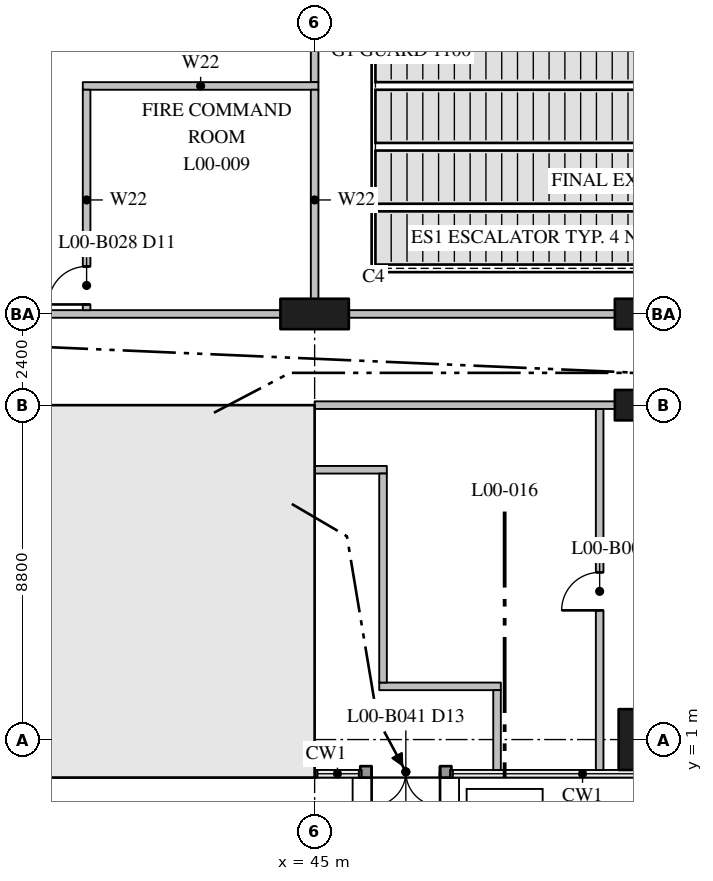
"""IFC4 building model, lengths in metres.
Left out: names, types, materials, properties, quantities, classifications, styles, units other than length and angle.
Written with IfcOpenShell. Run it as: python <this file> out.ifc"""

import sys

from ifc_helpers import new_model, si_unit, direction, frame, frame_2d, origin, origin_2d, place, context, subcontext, project, spatial, rectangle, extrude, element, fill, save


model = new_model("IFC4")
c1 = context("Model", 3, precision=1e-05, world=origin(), true_north=direction((0.0, 1.0)))
c2 = subcontext(c1, "Body", "Model", "MODEL_VIEW")
j1 = project(units=[si_unit("LENGTHUNIT", "METRE"), si_unit("PLANEANGLEUNIT", "RADIAN")], contexts=[c1])
p1 = place(None, origin())
s1 = spatial("IfcSite", under=j1, at=p1, CompositionType="ELEMENT")
p2 = place(p1, origin())
s2 = spatial("IfcBuilding", under=s1, at=p2, CompositionType="ELEMENT")
p3 = place(p2, origin())
s3 = spatial("IfcBuildingStorey", under=s2, at=p3, CompositionType="ELEMENT", Elevation=0.0)
p4 = place(p3, frame((45.0, 12.2, 0.0), z_axis=(0.0, 0.0, 1.0), x_axis=(1.0, 0.0, 0.0)))
e1 = element("IfcColumn", 1, at=p4, inside=s3, PredefinedType="COLUMN", context=c2, shape_type="SweptSolid", body=[
    extrude(rectangle(XDim=1.8, YDim=0.8, at=origin_2d()), origin(), (0.0, 0.0, 1.0), 7.5),
])
p5 = place(p3, frame((53.8, 1.0, 0.0), z_axis=(0.0, 0.0, 1.0), x_axis=(1.0, 0.0, 0.0)))
e2 = element("IfcColumn", 2, at=p5, inside=s3, PredefinedType="COLUMN", context=c2, shape_type="SweptSolid", body=[
    extrude(rectangle(XDim=1.6, YDim=1.6, at=origin_2d()), origin(), (0.0, 0.0, 1.0), 7.5),
])
for number, where, z_axis, x_axis in (
    (3, (53.8, 9.8, 0.0), (0.0, 0.0, 1.0), (1.0, 0.0, 0.0)),
    (4, (53.8, 12.2, 0.0), (0.0, 0.0, 1.0), (1.0, 0.0, 0.0)),
):
    element("IfcColumn", number, at=place(p3, frame(where, z_axis=z_axis, x_axis=x_axis)), inside=s3, PredefinedType="COLUMN", context=c2, shape_type="SweptSolid", body=[
        extrude(rectangle(XDim=1.8, YDim=0.8, at=origin_2d()), origin(), (0.0, 0.0, 1.0), 7.5),
    ])
p6 = place(p3, frame((9.8, 0.6, 0.0), z_axis=(0.0, 0.0, 1.0), x_axis=(1.0, 0.0, 0.0)))
e5 = element("IfcWall", 5, at=p6, inside=s3, PredefinedType="SHEAR", context=c2, shape_type="SweptSolid", body=[
    extrude(rectangle(XDim=35.2, YDim=1.2, at=frame_2d((17.6, 0.0))), origin(), (0.0, 0.0, 1.0), 7.5),
])
p7 = place(p3, frame((44.4, 1.2, 0.0), z_axis=(0.0, 0.0, 1.0), x_axis=(0.0, 1.0, 0.0)))
e6 = element("IfcWall", 6, at=p7, inside=s3, PredefinedType="SHEAR", context=c2, shape_type="SweptSolid", body=[
    extrude(rectangle(XDim=8.6, YDim=1.2, at=frame_2d((4.3, 0.0))), origin(), (0.0, 0.0, 1.0), 7.5),
])
p8 = place(p7, frame((5.4, 0.0, 0.0)))
e7 = element("IfcOpeningElement", 7, at=p8, cuts=e6, PredefinedType="OPENING", context=c2, shape_type="SweptSolid", body=[
    extrude(rectangle(XDim=1.2, YDim=2.1, at=frame_2d((0.6, 1.05))), frame((0.0, 0.61, 0.0), z_axis=(0.0, -1.0, 0.0), x_axis=(1.0, 0.0, 0.0)), (0.0, 0.0, 1.0), 1.22),
])
p9 = place(p3, frame((40.7, 9.6, 0.0), z_axis=(0.0, 0.0, 1.0), x_axis=(1.0, 0.0, 0.0)))
e8 = element("IfcWall", 8, at=p9, inside=s3, PredefinedType="SHEAR", context=c2, shape_type="SweptSolid", body=[
    extrude(rectangle(XDim=4.3, YDim=0.4, at=frame_2d((2.15, 0.0))), origin(), (0.0, 0.0, 1.0), 7.5),
])
p10 = place(p9, frame((1.05, 0.0, 0.0)))
e9 = element("IfcOpeningElement", 9, at=p10, cuts=e8, PredefinedType="OPENING", context=c2, shape_type="SweptSolid", body=[
    extrude(rectangle(XDim=1.2, YDim=2.1, at=frame_2d((0.6, 1.05))), frame((0.0, 0.21, 0.0), z_axis=(0.0, -1.0, 0.0), x_axis=(1.0, 0.0, 0.0)), (0.0, 0.0, 1.0), 0.42),
])
p11 = place(p3, frame((27.1, 9.6, 0.0), z_axis=(0.0, 0.0, 1.0), x_axis=(1.0, 0.0, 0.0)))
e10 = element("IfcWall", 10, at=p11, inside=s3, PredefinedType="SHEAR", context=c2, shape_type="SweptSolid", body=[
    extrude(rectangle(XDim=13.6, YDim=0.4, at=frame_2d((6.8, 0.0))), origin(), (0.0, 0.0, 1.0), 7.5),
])
p12 = place(p11, frame((0.85, 0.0, 0.0)))
e11 = element("IfcOpeningElement", 11, at=p12, cuts=e10, PredefinedType="OPENING", context=c2, shape_type="SweptSolid", body=[
    extrude(rectangle(XDim=0.9, YDim=2.1, at=frame_2d((0.45, 1.05))), frame((0.0, 0.21, 0.0), z_axis=(0.0, -1.0, 0.0), x_axis=(1.0, 0.0, 0.0)), (0.0, 0.0, 1.0), 0.42),
])
p13 = place(p11, frame((3.4, 0.0, 0.0)))
e12 = element("IfcOpeningElement", 12, at=p13, cuts=e10, PredefinedType="OPENING", context=c2, shape_type="SweptSolid", body=[
    extrude(rectangle(XDim=1.0, YDim=2.1, at=frame_2d((0.5, 1.05))), frame((0.0, 0.21, 0.0), z_axis=(0.0, -1.0, 0.0), x_axis=(1.0, 0.0, 0.0)), (0.0, 0.0, 1.0), 0.42),
])
p14 = place(p3, frame((14.1, 3.8, 0.0), z_axis=(0.0, 0.0, 1.0), x_axis=(1.0, 0.0, 0.0)))
e13 = element("IfcWall", 13, at=p14, inside=s3, PredefinedType="SHEAR", context=c2, shape_type="SweptSolid", body=[
    extrude(rectangle(XDim=26.6, YDim=0.4, at=frame_2d((13.3, 0.0))), origin(), (0.0, 0.0, 1.0), 7.5),
])
p15 = place(p14, frame((0.95, 0.0, 0.0)))
e14 = element("IfcOpeningElement", 14, at=p15, cuts=e13, PredefinedType="OPENING", context=c2, shape_type="SweptSolid", body=[
    extrude(rectangle(XDim=1.3, YDim=2.1, at=frame_2d((0.65, 1.05))), frame((0.0, 0.21, 0.0), z_axis=(0.0, -1.0, 0.0), x_axis=(1.0, 0.0, 0.0)), (0.0, 0.0, 1.0), 0.42),
])
p16 = place(p14, frame((3.95, 0.0, 0.0)))
e15 = element("IfcOpeningElement", 15, at=p16, cuts=e13, PredefinedType="OPENING", context=c2, shape_type="SweptSolid", body=[
    extrude(rectangle(XDim=1.1, YDim=2.1, at=frame_2d((0.55, 1.05))), frame((0.0, 0.21, 0.0), z_axis=(0.0, -1.0, 0.0), x_axis=(1.0, 0.0, 0.0)), (0.0, 0.0, 1.0), 0.42),
])
p17 = place(p14, frame((6.55, 0.0, 0.0)))
e16 = element("IfcOpeningElement", 16, at=p17, cuts=e13, PredefinedType="OPENING", context=c2, shape_type="SweptSolid", body=[
    extrude(rectangle(XDim=1.1, YDim=2.1, at=frame_2d((0.55, 1.05))), frame((0.0, 0.21, 0.0), z_axis=(0.0, -1.0, 0.0), x_axis=(1.0, 0.0, 0.0)), (0.0, 0.0, 1.0), 0.42),
])
p18 = place(p14, frame((9.15, 0.0, 0.0)))
e17 = element("IfcOpeningElement", 17, at=p18, cuts=e13, PredefinedType="OPENING", context=c2, shape_type="SweptSolid", body=[
    extrude(rectangle(XDim=1.1, YDim=2.1, at=frame_2d((0.55, 1.05))), frame((0.0, 0.21, 0.0), z_axis=(0.0, -1.0, 0.0), x_axis=(1.0, 0.0, 0.0)), (0.0, 0.0, 1.0), 0.42),
])
p19 = place(p14, frame((11.75, 0.0, 0.0)))
e18 = element("IfcOpeningElement", 18, at=p19, cuts=e13, PredefinedType="OPENING", context=c2, shape_type="SweptSolid", body=[
    extrude(rectangle(XDim=1.1, YDim=2.1, at=frame_2d((0.55, 1.05))), frame((0.0, 0.21, 0.0), z_axis=(0.0, -1.0, 0.0), x_axis=(1.0, 0.0, 0.0)), (0.0, 0.0, 1.0), 0.42),
])
p20 = place(p14, frame((14.35, 0.0, 0.0)))
e19 = element("IfcOpeningElement", 19, at=p20, cuts=e13, PredefinedType="OPENING", context=c2, shape_type="SweptSolid", body=[
    extrude(rectangle(XDim=1.1, YDim=2.1, at=frame_2d((0.55, 1.05))), frame((0.0, 0.21, 0.0), z_axis=(0.0, -1.0, 0.0), x_axis=(1.0, 0.0, 0.0)), (0.0, 0.0, 1.0), 0.42),
])
p21 = place(p14, frame((16.95, 0.0, 0.0)))
e20 = element("IfcOpeningElement", 20, at=p21, cuts=e13, PredefinedType="OPENING", context=c2, shape_type="SweptSolid", body=[
    extrude(rectangle(XDim=1.1, YDim=2.1, at=frame_2d((0.55, 1.05))), frame((0.0, 0.21, 0.0), z_axis=(0.0, -1.0, 0.0), x_axis=(1.0, 0.0, 0.0)), (0.0, 0.0, 1.0), 0.42),
])
p22 = place(p14, frame((19.55, 0.0, 0.0)))
e21 = element("IfcOpeningElement", 21, at=p22, cuts=e13, PredefinedType="OPENING", context=c2, shape_type="SweptSolid", body=[
    extrude(rectangle(XDim=1.1, YDim=2.1, at=frame_2d((0.55, 1.05))), frame((0.0, 0.21, 0.0), z_axis=(0.0, -1.0, 0.0), x_axis=(1.0, 0.0, 0.0)), (0.0, 0.0, 1.0), 0.42),
])
p23 = place(p14, frame((22.15, 0.0, 0.0)))
e22 = element("IfcOpeningElement", 22, at=p23, cuts=e13, PredefinedType="OPENING", context=c2, shape_type="SweptSolid", body=[
    extrude(rectangle(XDim=1.1, YDim=2.1, at=frame_2d((0.55, 1.05))), frame((0.0, 0.21, 0.0), z_axis=(0.0, -1.0, 0.0), x_axis=(1.0, 0.0, 0.0)), (0.0, 0.0, 1.0), 0.42),
])
p24 = place(p14, frame((24.75, 0.0, 0.0)))
e23 = element("IfcOpeningElement", 23, at=p24, cuts=e13, PredefinedType="OPENING", context=c2, shape_type="SweptSolid", body=[
    extrude(rectangle(XDim=1.1, YDim=2.1, at=frame_2d((0.55, 1.05))), frame((0.0, 0.21, 0.0), z_axis=(0.0, -1.0, 0.0), x_axis=(1.0, 0.0, 0.0)), (0.0, 0.0, 1.0), 0.42),
])
p25 = place(p3, frame((14.1, 6.8, 0.0), z_axis=(0.0, 0.0, 1.0), x_axis=(1.0, 0.0, 0.0)))
e24 = element("IfcWall", 24, at=p25, inside=s3, PredefinedType="SHEAR", context=c2, shape_type="SweptSolid", body=[
    extrude(rectangle(XDim=26.6, YDim=0.4, at=frame_2d((13.3, 0.0))), origin(), (0.0, 0.0, 1.0), 7.5),
])
p26 = place(p25, frame((10.8, 0.0, 0.0)))
e25 = element("IfcOpeningElement", 25, at=p26, cuts=e24, PredefinedType="OPENING", context=c2, shape_type="SweptSolid", body=[
    extrude(rectangle(XDim=1.8, YDim=2.1, at=frame_2d((0.9, 1.05))), frame((0.0, 0.21, 0.0), z_axis=(0.0, -1.0, 0.0), x_axis=(1.0, 0.0, 0.0)), (0.0, 0.0, 1.0), 0.42),
])
p27 = place(p25, frame((24.35, 0.0, 0.0)))
e26 = element("IfcOpeningElement", 26, at=p27, cuts=e24, PredefinedType="OPENING", context=c2, shape_type="SweptSolid", body=[
    extrude(rectangle(XDim=1.3, YDim=2.1, at=frame_2d((0.65, 1.05))), frame((0.0, 0.21, 0.0), z_axis=(0.0, -1.0, 0.0), x_axis=(1.0, 0.0, 0.0)), (0.0, 0.0, 1.0), 0.42),
])
p28 = place(p3, frame((40.7, 1.2, 0.0), z_axis=(0.0, 0.0, 1.0), x_axis=(0.0, 1.0, 0.0)))
e27 = element("IfcWall", 27, at=p28, inside=s3, PredefinedType="SHEAR", context=c2, shape_type="SweptSolid", body=[
    extrude(rectangle(XDim=8.4, YDim=0.4, at=frame_2d((4.2, 0.0))), origin(), (0.0, 0.0, 1.0), 7.5),
])
p29 = place(p28, frame((4.45, 0.0, 0.0)))
e28 = element("IfcOpeningElement", 28, at=p29, cuts=e27, PredefinedType="OPENING", context=c2, shape_type="SweptSolid", body=[
    extrude(rectangle(XDim=0.9, YDim=2.1, at=frame_2d((0.45, 1.05))), frame((0.0, 0.21, 0.0), z_axis=(0.0, -1.0, 0.0), x_axis=(1.0, 0.0, 0.0)), (0.0, 0.0, 1.0), 0.42),
])
p30 = place(p3, frame((38.1, 1.2, 0.0), z_axis=(0.0, 0.0, 1.0), x_axis=(0.0, 1.0, 0.0)))
e29 = element("IfcWall", 29, at=p30, inside=s3, PredefinedType="SHEAR", context=c2, shape_type="SweptSolid", body=[
    extrude(rectangle(XDim=2.4, YDim=0.25, at=frame_2d((1.2, 0.0))), origin(), (0.0, 0.0, 1.0), 7.5),
])
p31 = place(p3, frame((46.7, 2.4, 0.0), z_axis=(0.0, 0.0, 1.0), x_axis=(1.0, 0.0, 0.0)))
e30 = element("IfcWall", 30, at=p31, inside=s3, PredefinedType="PARTITIONING", context=c2, shape_type="SweptSolid", body=[
    extrude(rectangle(XDim=3.2, YDim=0.2, at=frame_2d((1.6, 0.0))), origin(), (0.0, 0.0, 1.0), 7.1),
])
p32 = place(p3, frame((45.0, 8.1, 0.0), z_axis=(0.0, 0.0, 1.0), x_axis=(1.0, 0.0, 0.0)))
e31 = element("IfcWall", 31, at=p32, inside=s3, PredefinedType="PARTITIONING", context=c2, shape_type="SweptSolid", body=[
    extrude(rectangle(XDim=1.9, YDim=0.2, at=frame_2d((0.95, 0.0))), origin(), (0.0, 0.0, 1.0), 7.1),
])
p33 = place(p3, frame((45.0, 9.8, 0.0), z_axis=(0.0, 0.0, 1.0), x_axis=(1.0, 0.0, 0.0)))
e32 = element("IfcWall", 32, at=p33, inside=s3, PredefinedType="PARTITIONING", context=c2, shape_type="SweptSolid", body=[
    extrude(rectangle(XDim=19.4, YDim=0.2, at=frame_2d((9.7, 0.0))), origin(), (0.0, 0.0, 1.0), 7.1),
])
p34 = place(p33, frame((10.6, 0.0, 0.0)))
e33 = element("IfcOpeningElement", 33, at=p34, cuts=e32, PredefinedType="OPENING", context=c2, shape_type="SweptSolid", body=[
    extrude(rectangle(XDim=1.8, YDim=2.1, at=frame_2d((0.9, 1.05))), frame((0.0, 0.11, 0.0), z_axis=(0.0, -1.0, 0.0), x_axis=(1.0, 0.0, 0.0)), (0.0, 0.0, 1.0), 0.22),
])
p35 = place(p33, frame((14.0, 0.0, 0.0)))
e34 = element("IfcOpeningElement", 34, at=p35, cuts=e32, PredefinedType="OPENING", context=c2, shape_type="SweptSolid", body=[
    extrude(rectangle(XDim=1.8, YDim=2.1, at=frame_2d((0.9, 1.05))), frame((0.0, 0.11, 0.0), z_axis=(0.0, -1.0, 0.0), x_axis=(1.0, 0.0, 0.0)), (0.0, 0.0, 1.0), 0.22),
])
p36 = place(p3, frame((35.4, 12.2, 0.0), z_axis=(0.0, 0.0, 1.0), x_axis=(1.0, 0.0, 0.0)))
e35 = element("IfcWall", 35, at=p36, inside=s3, PredefinedType="PARTITIONING", context=c2, shape_type="SweptSolid", body=[
    extrude(rectangle(XDim=22.4, YDim=0.2, at=frame_2d((11.2, 0.0))), origin(), (0.0, 0.0, 1.0), 7.1),
])
p37 = place(p3, frame((38.9, 18.2, 0.0), z_axis=(0.0, 0.0, 1.0), x_axis=(1.0, 0.0, 0.0)))
e36 = element("IfcWall", 36, at=p37, inside=s3, PredefinedType="PARTITIONING", context=c2, shape_type="SweptSolid", body=[
    extrude(rectangle(XDim=6.2, YDim=0.2, at=frame_2d((3.1, 0.0))), origin(), (0.0, 0.0, 1.0), 7.1),
])
p38 = place(p3, frame((46.8, 2.5, 0.0), z_axis=(0.0, 0.0, 1.0), x_axis=(0.0, 1.0, 0.0)))
e37 = element("IfcWall", 37, at=p38, inside=s3, PredefinedType="PARTITIONING", context=c2, shape_type="SweptSolid", body=[
    extrude(rectangle(XDim=5.5, YDim=0.2, at=frame_2d((2.75, 0.0))), origin(), (0.0, 0.0, 1.0), 7.1),
])
p39 = place(p3, frame((49.8, 0.2, 0.0), z_axis=(0.0, 0.0, 1.0), x_axis=(0.0, 1.0, 0.0)))
e38 = element("IfcWall", 38, at=p39, inside=s3, PredefinedType="PARTITIONING", context=c2, shape_type="SweptSolid", body=[
    extrude(rectangle(XDim=2.1, YDim=0.2, at=frame_2d((1.05, 0.0))), origin(), (0.0, 0.0, 1.0), 7.1),
])
p40 = place(p3, frame((39.0, 12.3, 0.0), z_axis=(0.0, 0.0, 1.0), x_axis=(0.0, 1.0, 0.0)))
e39 = element("IfcWall", 39, at=p40, inside=s3, PredefinedType="PARTITIONING", context=c2, shape_type="SweptSolid", body=[
    extrude(rectangle(XDim=5.8, YDim=0.2, at=frame_2d((2.9, 0.0))), origin(), (0.0, 0.0, 1.0), 7.1),
])
p41 = place(p40, frame((0.15, 0.0, 0.0)))
e40 = element("IfcOpeningElement", 40, at=p41, cuts=e39, PredefinedType="OPENING", context=c2, shape_type="SweptSolid", body=[
    extrude(rectangle(XDim=1.0, YDim=2.1, at=frame_2d((0.5, 1.05))), frame((0.0, 0.11, 0.0), z_axis=(0.0, -1.0, 0.0), x_axis=(1.0, 0.0, 0.0)), (0.0, 0.0, 1.0), 0.22),
])
p42 = place(p3, frame((45.0, 12.3, 0.0), z_axis=(0.0, 0.0, 1.0), x_axis=(0.0, 1.0, 0.0)))
e41 = element("IfcWall", 41, at=p42, inside=s3, PredefinedType="PARTITIONING", context=c2, shape_type="SweptSolid", body=[
    extrude(rectangle(XDim=5.8, YDim=0.2, at=frame_2d((2.9, 0.0))), origin(), (0.0, 0.0, 1.0), 7.1),
])
p43 = place(p3, frame((45.0, 18.3, 0.0), z_axis=(0.0, 0.0, 1.0), x_axis=(0.0, 1.0, 0.0)))
e42 = element("IfcWall", 42, at=p43, inside=s3, PredefinedType="PARTITIONING", context=c2, shape_type="SweptSolid", body=[
    extrude(rectangle(XDim=8.4, YDim=0.2, at=frame_2d((4.2, 0.0))), origin(), (0.0, 0.0, 1.0), 7.1),
])
p44 = place(p43, frame((4.4, 0.0, 0.0)))
e43 = element("IfcOpeningElement", 43, at=p44, cuts=e42, PredefinedType="OPENING", context=c2, shape_type="SweptSolid", body=[
    extrude(rectangle(XDim=2.4, YDim=2.4, at=frame_2d((1.2, 1.2))), frame((0.0, 0.11, 0.0), z_axis=(0.0, -1.0, 0.0), x_axis=(1.0, 0.0, 0.0)), (0.0, 0.0, 1.0), 0.22),
])
p45 = place(p3, frame((52.5, 0.2, 0.0), z_axis=(0.0, 0.0, 1.0), x_axis=(0.0, 1.0, 0.0)))
e44 = element("IfcWall", 44, at=p45, inside=s3, PredefinedType="PARTITIONING", context=c2, shape_type="SweptSolid", body=[
    extrude(rectangle(XDim=9.5, YDim=0.2, at=frame_2d((4.75, 0.0))), origin(), (0.0, 0.0, 1.0), 7.1),
])
p46 = place(p45, frame((4.2, 0.0, 0.0)))
e45 = element("IfcOpeningElement", 45, at=p46, cuts=e44, PredefinedType="OPENING", context=c2, shape_type="SweptSolid", body=[
    extrude(rectangle(XDim=1.0, YDim=2.1, at=frame_2d((0.5, 1.05))), frame((0.0, 0.11, 0.0), z_axis=(0.0, -1.0, 0.0), x_axis=(1.0, 0.0, 0.0)), (0.0, 0.0, 1.0), 0.22),
])
p47 = place(p3, frame((48.6, 0.15, 0.0), z_axis=(0.0, 0.0, 1.0), x_axis=(-1.0, 0.0, 0.0)))
e46 = element("IfcWall", 46, at=p47, inside=s3, PredefinedType="STANDARD", context=c2, shape_type="SweptSolid", body=[
    extrude(rectangle(XDim=2.4, YDim=0.3, at=frame_2d((1.2, 0.0))), origin(), (0.0, 0.0, 1.0), 7.1),
])
p48 = place(p47, frame((0.3, 0.0, 0.0)))
e47 = element("IfcOpeningElement", 47, at=p48, cuts=e46, PredefinedType="OPENING", context=c2, shape_type="SweptSolid", body=[
    extrude(rectangle(XDim=1.8, YDim=2.1, at=frame_2d((0.9, 1.05))), frame((0.0, 0.16, 0.0), z_axis=(0.0, -1.0, 0.0), x_axis=(1.0, 0.0, 0.0)), (0.0, 0.0, 1.0), 0.32),
])
p49 = place(p24, origin())
e48 = element("IfcDoor", 48, at=p49, inside=s3, OperationType="DOUBLE_DOOR_SLIDING", PredefinedType="DOOR", context=c2, shape_type="SweptSolid", body=[
    extrude(rectangle(XDim=1.1, YDim=2.1, at=frame_2d((0.55, 1.05))), frame((0.0, 0.025, 0.0), z_axis=(0.0, -1.0, 0.0), x_axis=(1.0, 0.0, 0.0)), (0.0, 0.0, 1.0), 0.05),
])
fill(e23, e48)
p50 = place(p27, origin())
e49 = element("IfcDoor", 49, at=p50, inside=s3, OperationType="DOUBLE_DOOR_SLIDING", PredefinedType="DOOR", context=c2, shape_type="SweptSolid", body=[
    extrude(rectangle(XDim=1.3, YDim=2.1, at=frame_2d((0.65, 1.05))), frame((0.0, 0.025, 0.0), z_axis=(0.0, -1.0, 0.0), x_axis=(1.0, 0.0, 0.0)), (0.0, 0.0, 1.0), 0.05),
])
fill(e26, e49)
p51 = place(p10, origin())
e50 = element("IfcDoor", 50, at=p51, inside=s3, OperationType="SINGLE_SWING_LEFT", PredefinedType="DOOR", context=c2, shape_type="SweptSolid", body=[
    extrude(rectangle(XDim=1.2, YDim=2.1, at=frame_2d((0.6, 1.05))), frame((0.0, 0.025, 0.0), z_axis=(0.0, -1.0, 0.0), x_axis=(1.0, 0.0, 0.0)), (0.0, 0.0, 1.0), 0.05),
])
fill(e9, e50)
p52 = place(p8, frame((1.2, 0.0, 0.0), z_axis=(0.0, 0.0, 1.0), x_axis=(-1.0, 0.0, 0.0)))
e51 = element("IfcDoor", 51, at=p52, inside=s3, OperationType="SINGLE_SWING_LEFT", PredefinedType="DOOR", context=c2, shape_type="SweptSolid", body=[
    extrude(rectangle(XDim=1.2, YDim=2.1, at=frame_2d((0.6, 1.05))), frame((0.0, 0.025, 0.0), z_axis=(0.0, -1.0, 0.0), x_axis=(1.0, 0.0, 0.0)), (0.0, 0.0, 1.0), 0.05),
])
fill(e7, e51)
p53 = place(p29, origin())
e52 = element("IfcDoor", 52, at=p53, inside=s3, OperationType="SINGLE_SWING_RIGHT", PredefinedType="DOOR", context=c2, shape_type="SweptSolid", body=[
    extrude(rectangle(XDim=0.9, YDim=2.1, at=frame_2d((0.45, 1.05))), frame((0.0, 0.025, 0.0), z_axis=(0.0, -1.0, 0.0), x_axis=(1.0, 0.0, 0.0)), (0.0, 0.0, 1.0), 0.05),
])
fill(e28, e52)
p54 = place(p46, origin())
e53 = element("IfcDoor", 53, at=p54, inside=s3, OperationType="SINGLE_SWING_LEFT", PredefinedType="DOOR", context=c2, shape_type="SweptSolid", body=[
    extrude(rectangle(XDim=1.0, YDim=2.1, at=frame_2d((0.5, 1.05))), frame((0.0, 0.025, 0.0), z_axis=(0.0, -1.0, 0.0), x_axis=(1.0, 0.0, 0.0)), (0.0, 0.0, 1.0), 0.05),
])
fill(e45, e53)
p55 = place(p41, origin())
e54 = element("IfcDoor", 54, at=p55, inside=s3, OperationType="SINGLE_SWING_LEFT", PredefinedType="DOOR", context=c2, shape_type="SweptSolid", body=[
    extrude(rectangle(XDim=1.0, YDim=2.1, at=frame_2d((0.5, 1.05))), frame((0.0, 0.025, 0.0), z_axis=(0.0, -1.0, 0.0), x_axis=(1.0, 0.0, 0.0)), (0.0, 0.0, 1.0), 0.05),
])
fill(e40, e54)
p56 = place(p48, origin())
e55 = element("IfcDoor", 55, at=p56, inside=s3, OperationType="DOUBLE_DOOR_SINGLE_SWING", PredefinedType="DOOR", context=c2, shape_type="SweptSolid", body=[
    extrude(rectangle(XDim=1.8, YDim=2.1, at=frame_2d((0.9, 1.05))), frame((0.0, 0.025, 0.0), z_axis=(0.0, -1.0, 0.0), x_axis=(1.0, 0.0, 0.0)), (0.0, 0.0, 1.0), 0.05),
])
fill(e47, e55)
save(model, sys.argv[1])
